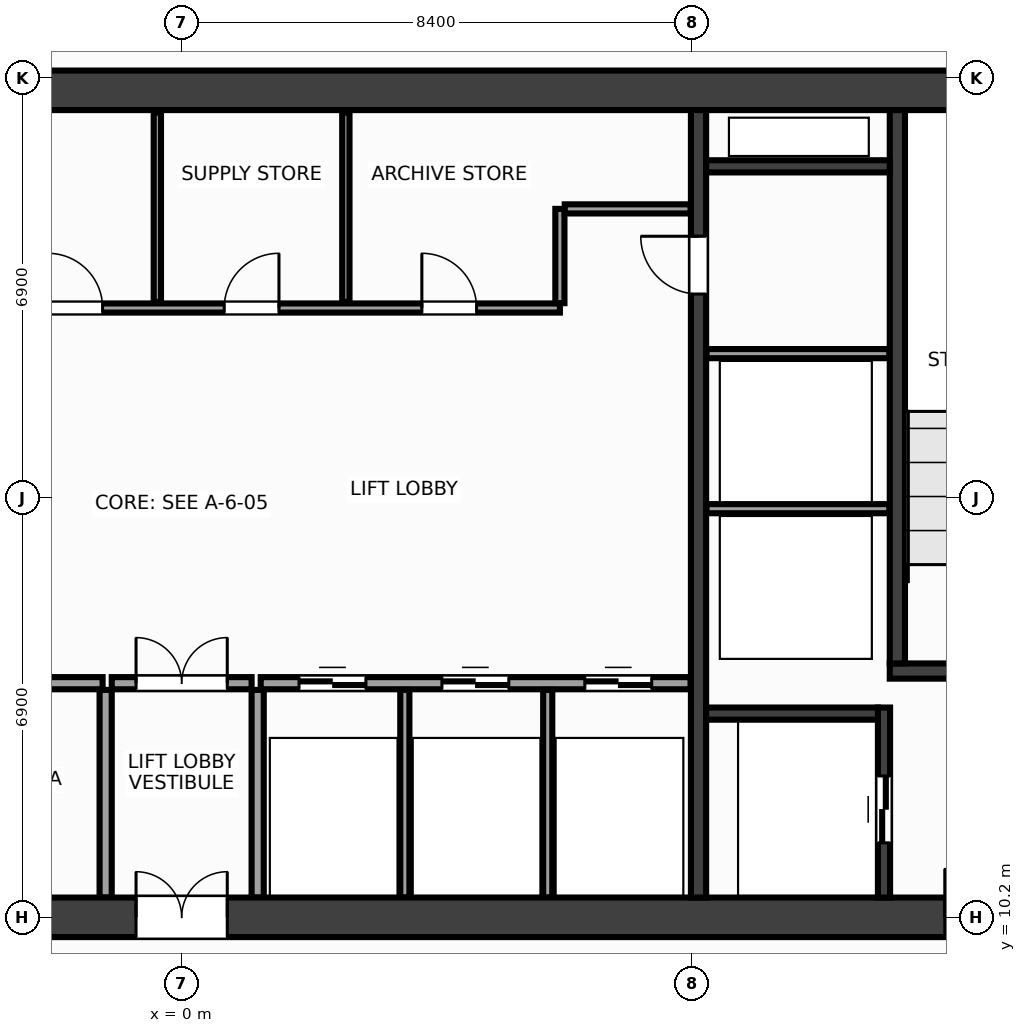
"""IFC4 building model, lengths in metres.
Left out: names, types, materials, properties, quantities, classifications, styles, units other than length and angle.
Written with IfcOpenShell. Run it as: python <this file> out.ifc"""

import sys

from ifc_helpers import new_model, si_unit, direction, frame, frame_2d, origin, place, context, subcontext, project, spatial, rectangle, extrude, source, transform, mapped, element, fill, save


model = new_model("IFC4")
c1 = context("Model", 3, precision=1e-05, world=origin(), true_north=direction((0.0, 1.0)))
c2 = subcontext(c1, "Body", "Model", "MODEL_VIEW")
j1 = project(units=[si_unit("LENGTHUNIT", "METRE"), si_unit("PLANEANGLEUNIT", "RADIAN")], contexts=[c1])
p1 = place(None, origin())
s1 = spatial("IfcSite", under=j1, at=p1, CompositionType="ELEMENT")
p2 = place(p1, origin())
s2 = spatial("IfcBuilding", under=s1, at=p2, CompositionType="ELEMENT")
p3 = place(p2, frame((0.0, 0.0, 182.0)))
s3 = spatial("IfcBuildingStorey", under=s2, at=p3, CompositionType="ELEMENT", Elevation=182.0)
m1 = source(origin(), c2, "Body", "SweptSolid", [
    extrude(rectangle(XDim=31.85, YDim=0.65, at=frame_2d((15.925, 0.0))), origin(), (0.0, 0.0, 1.0), 3.6),
])
p4 = place(p3, frame((-15.925, 23.8, 0.0), z_axis=(0.0, 0.0, 1.0), x_axis=(1.0, 0.0, 0.0)))
e1 = element("IfcWall", 1, at=p4, inside=s3, PredefinedType="SHEAR", context=c2, shape_type="MappedRepresentation", body=[
    mapped(m1, transform((0.0, 0.0, 0.0), x_axis=(1.0, 0.0, 0.0), y_axis=(0.0, 1.0, 0.0), z_axis=(0.0, 0.0, 1.0), scale=1.0)),
])
p5 = place(p3, frame((-15.925, 10.2, 0.0), z_axis=(0.0, 0.0, 1.0), x_axis=(1.0, 0.0, 0.0)))
e2 = element("IfcWall", 2, at=p5, inside=s3, PredefinedType="SHEAR", context=c2, shape_type="MappedRepresentation", body=[
    mapped(m1, transform((0.0, 0.0, 0.0), x_axis=(1.0, 0.0, 0.0), y_axis=(0.0, 1.0, 0.0), z_axis=(0.0, 0.0, 1.0), scale=1.0)),
])
p6 = place(p5, frame((1.775, 0.0, 0.0)))
e3 = element("IfcOpeningElement", 3, at=p6, cuts=e2, PredefinedType="OPENING", context=c2, shape_type="SweptSolid", body=[
    extrude(rectangle(XDim=1.6, YDim=2.15, at=frame_2d((0.8, 1.075))), frame((0.0, 0.337, 0.0), z_axis=(0.0, -1.0, 0.0), x_axis=(1.0, 0.0, 0.0)), (0.0, 0.0, 1.0), 0.674),
])
p7 = place(p5, frame((28.475, 0.0, 0.0)))
e4 = element("IfcOpeningElement", 4, at=p7, cuts=e2, PredefinedType="OPENING", context=c2, shape_type="SweptSolid", body=[
    extrude(rectangle(XDim=1.6, YDim=2.15, at=frame_2d((0.8, 1.075))), frame((0.0, 0.337, 0.0), z_axis=(0.0, -1.0, 0.0), x_axis=(1.0, 0.0, 0.0)), (0.0, 0.0, 1.0), 0.674),
])
p8 = place(p5, frame((15.175, 0.0, 0.0)))
e5 = element("IfcOpeningElement", 5, at=p8, cuts=e2, PredefinedType="OPENING", context=c2, shape_type="SweptSolid", body=[
    extrude(rectangle(XDim=1.5, YDim=2.2, at=frame_2d((0.75, 1.1))), frame((0.0, 0.337, 0.0), z_axis=(0.0, -1.0, 0.0), x_axis=(1.0, 0.0, 0.0)), (0.0, 0.0, 1.0), 0.674),
])
m2 = source(origin(), c2, "Body", "SweptSolid", [
    extrude(rectangle(XDim=12.95, YDim=0.25, at=frame_2d((6.475, 0.0))), origin(), (0.0, 0.0, 1.0), 3.6),
])
p9 = place(p3, frame((8.5, 10.525, 0.0), z_axis=(0.0, 0.0, 1.0), x_axis=(0.0, 1.0, 0.0)))
e6 = element("IfcWall", 6, at=p9, inside=s3, PredefinedType="SHEAR", context=c2, shape_type="MappedRepresentation", body=[
    mapped(m2, transform((0.0, 0.0, 0.0), x_axis=(1.0, 0.0, 0.0), y_axis=(0.0, 1.0, 0.0), z_axis=(0.0, 0.0, 1.0), scale=1.0)),
])
p10 = place(p9, frame((9.925, 0.0, 0.0)))
e7 = element("IfcOpeningElement", 7, at=p10, cuts=e6, PredefinedType="OPENING", context=c2, shape_type="SweptSolid", body=[
    extrude(rectangle(XDim=0.95, YDim=2.15, at=frame_2d((0.475, 1.075))), frame((0.0, 0.137, 0.0), z_axis=(0.0, -1.0, 0.0), x_axis=(1.0, 0.0, 0.0)), (0.0, 0.0, 1.0), 0.274),
])
m3 = source(origin(), c2, "Body", "SweptSolid", [
    extrude(rectangle(XDim=3.63, YDim=0.25, at=frame_2d((1.815, 0.0))), origin(), (0.0, 0.0, 1.0), 3.6),
])
p11 = place(p3, frame((11.645, 14.25, 0.0), z_axis=(0.0, 0.0, 1.0), x_axis=(1.0, 0.0, 0.0)))
e8 = element("IfcWall", 8, at=p11, inside=s3, PredefinedType="SHEAR", context=c2, shape_type="MappedRepresentation", body=[
    mapped(m3, transform((0.0, 0.0, 0.0), x_axis=(1.0, 0.0, 0.0), y_axis=(0.0, 1.0, 0.0), z_axis=(0.0, 0.0, 1.0), scale=1.0)),
])
p12 = place(p11, frame((0.95, 0.0, 0.0)))
e9 = element("IfcOpeningElement", 9, at=p12, cuts=e8, PredefinedType="OPENING", context=c2, shape_type="SweptSolid", body=[
    extrude(rectangle(XDim=1.6, YDim=2.15, at=frame_2d((0.8, 1.075))), frame((0.0, 0.137, 0.0), z_axis=(0.0, -1.0, 0.0), x_axis=(1.0, 0.0, 0.0)), (0.0, 0.0, 1.0), 0.274),
])
m4 = source(origin(), c2, "Body", "SweptSolid", [
    extrude(rectangle(XDim=9.1, YDim=0.25, at=frame_2d((4.55, 0.0))), origin(), (0.0, 0.0, 1.0), 3.6),
])
p13 = place(p3, frame((11.77, 14.375, 0.0), z_axis=(0.0, 0.0, 1.0), x_axis=(0.0, 1.0, 0.0)))
e10 = element("IfcWall", 10, at=p13, inside=s3, PredefinedType="SHEAR", context=c2, shape_type="MappedRepresentation", body=[
    mapped(m4, transform((0.0, 0.0, 0.0), x_axis=(1.0, 0.0, 0.0), y_axis=(0.0, 1.0, 0.0), z_axis=(0.0, 0.0, 1.0), scale=1.0)),
])
m5 = source(origin(), c2, "Body", "SweptSolid", [
    extrude(rectangle(XDim=3.125, YDim=0.2, at=frame_2d((1.562, 0.0))), origin(), (0.0, 0.0, 1.0), 3.6),
])
p14 = place(p3, frame((11.55, 10.525, 0.0), z_axis=(0.0, 0.0, 1.0), x_axis=(0.0, 1.0, 0.0)))
e11 = element("IfcWall", 11, at=p14, inside=s3, PredefinedType="SHEAR", context=c2, shape_type="MappedRepresentation", body=[
    mapped(m5, transform((0.0, 0.0, 0.0), x_axis=(1.0, 0.0, 0.0), y_axis=(0.0, 1.0, 0.0), z_axis=(0.0, 0.0, 1.0), scale=1.0)),
])
p15 = place(p14, frame((0.9, 0.0, 0.0)))
e12 = element("IfcOpeningElement", 12, at=p15, cuts=e11, PredefinedType="OPENING", context=c2, shape_type="SweptSolid", body=[
    extrude(rectangle(XDim=1.1, YDim=2.15, at=frame_2d((0.55, 1.075))), frame((0.0, 0.112, 0.0), z_axis=(0.0, -1.0, 0.0), x_axis=(1.0, 0.0, 0.0)), (0.0, 0.0, 1.0), 0.224),
])
m6 = source(origin(), c2, "Body", "SweptSolid", [
    extrude(rectangle(XDim=2.825, YDim=0.2, at=frame_2d((1.413, 0.0))), origin(), (0.0, 0.0, 1.0), 3.6),
])
p16 = place(p3, frame((8.625, 13.55, 0.0), z_axis=(0.0, 0.0, 1.0), x_axis=(1.0, 0.0, 0.0)))
e13 = element("IfcWall", 13, at=p16, inside=s3, PredefinedType="SHEAR", context=c2, shape_type="MappedRepresentation", body=[
    mapped(m6, transform((0.0, 0.0, 0.0), x_axis=(1.0, 0.0, 0.0), y_axis=(0.0, 1.0, 0.0), z_axis=(0.0, 0.0, 1.0), scale=1.0)),
])
m7 = source(origin(), c2, "Body", "SweptSolid", [
    extrude(rectangle(XDim=3.02, YDim=0.2, at=frame_2d((1.51, 0.0))), origin(), (0.0, 0.0, 1.0), 3.6),
])
p17 = place(p3, frame((8.625, 22.55, 0.0), z_axis=(0.0, 0.0, 1.0), x_axis=(1.0, 0.0, 0.0)))
e14 = element("IfcWall", 14, at=p17, inside=s3, PredefinedType="SHEAR", context=c2, shape_type="MappedRepresentation", body=[
    mapped(m7, transform((0.0, 0.0, 0.0), x_axis=(1.0, 0.0, 0.0), y_axis=(0.0, 1.0, 0.0), z_axis=(0.0, 0.0, 1.0), scale=1.0)),
])
m8 = source(origin(), c2, "Body", "SweptSolid", [
    extrude(rectangle(XDim=3.01, YDim=0.15, at=frame_2d((1.505, 0.0))), origin(), (0.0, 0.0, 1.0), 3.38),
])
for number, where, z_axis, x_axis in (
    (15, (8.63, 16.92, 0.0), (0.0, 0.0, 1.0), (1.0, 0.0, 0.0)),
    (16, (8.63, 19.47, 0.0), (0.0, 0.0, 1.0), (1.0, 0.0, 0.0)),
):
    element("IfcWall", number, at=place(p3, frame(where, z_axis=z_axis, x_axis=x_axis)), inside=s3, PredefinedType="PARTITIONING", context=c2, shape_type="MappedRepresentation", body=[
        mapped(m8, transform((0.0, 0.0, 0.0), x_axis=(1.0, 0.0, 0.0), y_axis=(0.0, 1.0, 0.0), z_axis=(0.0, 0.0, 1.0), scale=1.0)),
    ])
m9 = source(origin(), c2, "Body", "SweptSolid", [
    extrude(rectangle(XDim=7.07, YDim=0.2, at=frame_2d((3.535, 0.0))), origin(), (0.0, 0.0, 1.0), 3.38),
])
p18 = place(p3, frame((-8.37, 14.05, 0.0), z_axis=(0.0, 0.0, 1.0), x_axis=(1.0, 0.0, 0.0)))
e17 = element("IfcWall", 17, at=p18, inside=s3, PredefinedType="PARTITIONING", context=c2, shape_type="MappedRepresentation", body=[
    mapped(m9, transform((0.0, 0.0, 0.0), x_axis=(1.0, 0.0, 0.0), y_axis=(0.0, 1.0, 0.0), z_axis=(0.0, 0.0, 1.0), scale=1.0)),
])
p19 = place(p18, frame((1.06, 0.0, 0.0)))
e18 = element("IfcOpeningElement", 18, at=p19, cuts=e17, PredefinedType="OPENING", context=c2, shape_type="SweptSolid", body=[
    extrude(rectangle(XDim=0.9, YDim=2.15, at=frame_2d((0.45, 1.075))), frame((0.0, 0.112, 0.0), z_axis=(0.0, -1.0, 0.0), x_axis=(1.0, 0.0, 0.0)), (0.0, 0.0, 1.0), 0.224),
])
p20 = place(p18, frame((4.51, 0.0, 0.0)))
e19 = element("IfcOpeningElement", 19, at=p20, cuts=e17, PredefinedType="OPENING", context=c2, shape_type="SweptSolid", body=[
    extrude(rectangle(XDim=0.9, YDim=2.15, at=frame_2d((0.45, 1.075))), frame((0.0, 0.112, 0.0), z_axis=(0.0, -1.0, 0.0), x_axis=(1.0, 0.0, 0.0)), (0.0, 0.0, 1.0), 0.224),
])
p21 = place(p3, frame((1.3, 14.05, 0.0), z_axis=(0.0, 0.0, 1.0), x_axis=(1.0, 0.0, 0.0)))
e20 = element("IfcWall", 20, at=p21, inside=s3, PredefinedType="PARTITIONING", context=c2, shape_type="MappedRepresentation", body=[
    mapped(m9, transform((0.0, 0.0, 0.0), x_axis=(1.0, 0.0, 0.0), y_axis=(0.0, 1.0, 0.0), z_axis=(0.0, 0.0, 1.0), scale=1.0)),
])
p22 = place(p21, frame((0.63, 0.0, 0.0)))
e21 = element("IfcOpeningElement", 21, at=p22, cuts=e20, PredefinedType="OPENING", context=c2, shape_type="SweptSolid", body=[
    extrude(rectangle(XDim=1.1, YDim=2.15, at=frame_2d((0.55, 1.075))), frame((0.0, 0.112, 0.0), z_axis=(0.0, -1.0, 0.0), x_axis=(1.0, 0.0, 0.0)), (0.0, 0.0, 1.0), 0.224),
])
p23 = place(p21, frame((2.98, 0.0, 0.0)))
e22 = element("IfcOpeningElement", 22, at=p23, cuts=e20, PredefinedType="OPENING", context=c2, shape_type="SweptSolid", body=[
    extrude(rectangle(XDim=1.1, YDim=2.15, at=frame_2d((0.55, 1.075))), frame((0.0, 0.112, 0.0), z_axis=(0.0, -1.0, 0.0), x_axis=(1.0, 0.0, 0.0)), (0.0, 0.0, 1.0), 0.224),
])
p24 = place(p21, frame((5.33, 0.0, 0.0)))
e23 = element("IfcOpeningElement", 23, at=p24, cuts=e20, PredefinedType="OPENING", context=c2, shape_type="SweptSolid", body=[
    extrude(rectangle(XDim=1.1, YDim=2.15, at=frame_2d((0.55, 1.075))), frame((0.0, 0.112, 0.0), z_axis=(0.0, -1.0, 0.0), x_axis=(1.0, 0.0, 0.0)), (0.0, 0.0, 1.0), 0.224),
])
m10 = source(origin(), c2, "Body", "SweptSolid", [
    extrude(rectangle(XDim=3.415, YDim=0.2, at=frame_2d((1.708, 0.0))), origin(), (0.0, 0.0, 1.0), 3.38),
])
for number, where, z_axis, x_axis in (
    (24, (-1.25, 10.525, 0.0), (0.0, 0.0, 1.0), (0.0, 1.0, 0.0)),
    (25, (1.25, 10.525, 0.0), (0.0, 0.0, 1.0), (0.0, 1.0, 0.0)),
):
    element("IfcWall", number, at=place(p3, frame(where, z_axis=z_axis, x_axis=x_axis)), inside=s3, PredefinedType="PARTITIONING", context=c2, shape_type="MappedRepresentation", body=[
        mapped(m10, transform((0.0, 0.0, 0.0), x_axis=(1.0, 0.0, 0.0), y_axis=(0.0, 1.0, 0.0), z_axis=(0.0, 0.0, 1.0), scale=1.0)),
    ])
m11 = source(origin(), c2, "Body", "SweptSolid", [
    extrude(rectangle(XDim=2.3, YDim=0.2, at=frame_2d((1.15, 0.0))), origin(), (0.0, 0.0, 1.0), 3.38),
])
p25 = place(p3, frame((-1.15, 14.05, 0.0), z_axis=(0.0, 0.0, 1.0), x_axis=(1.0, 0.0, 0.0)))
e26 = element("IfcWall", 26, at=p25, inside=s3, PredefinedType="PARTITIONING", context=c2, shape_type="MappedRepresentation", body=[
    mapped(m11, transform((0.0, 0.0, 0.0), x_axis=(1.0, 0.0, 0.0), y_axis=(0.0, 1.0, 0.0), z_axis=(0.0, 0.0, 1.0), scale=1.0)),
])
p26 = place(p25, frame((0.4, 0.0, 0.0)))
e27 = element("IfcOpeningElement", 27, at=p26, cuts=e26, PredefinedType="OPENING", context=c2, shape_type="SweptSolid", body=[
    extrude(rectangle(XDim=1.5, YDim=2.2, at=frame_2d((0.75, 1.1))), frame((0.0, 0.112, 0.0), z_axis=(0.0, -1.0, 0.0), x_axis=(1.0, 0.0, 0.0)), (0.0, 0.0, 1.0), 0.224),
])
m12 = source(origin(), c2, "Body", "SweptSolid", [
    extrude(rectangle(XDim=14.59, YDim=0.15, at=frame_2d((7.295, 0.0))), origin(), (0.0, 0.0, 1.0), 3.38),
])
p27 = place(p3, frame((-8.37, 20.22, 0.0), z_axis=(0.0, 0.0, 1.0), x_axis=(1.0, 0.0, 0.0)))
e28 = element("IfcWall", 28, at=p27, inside=s3, PredefinedType="PARTITIONING", context=c2, shape_type="MappedRepresentation", body=[
    mapped(m12, transform((0.0, 0.0, 0.0), x_axis=(1.0, 0.0, 0.0), y_axis=(0.0, 1.0, 0.0), z_axis=(0.0, 0.0, 1.0), scale=1.0)),
])
p28 = place(p27, frame((0.86, 0.0, 0.0)))
e29 = element("IfcOpeningElement", 29, at=p28, cuts=e28, PredefinedType="OPENING", context=c2, shape_type="SweptSolid", body=[
    extrude(rectangle(XDim=0.9, YDim=2.15, at=frame_2d((0.45, 1.075))), frame((0.0, 0.087, 0.0), z_axis=(0.0, -1.0, 0.0), x_axis=(1.0, 0.0, 0.0)), (0.0, 0.0, 1.0), 0.174),
])
p29 = place(p27, frame((3.47, 0.0, 0.0)))
e30 = element("IfcOpeningElement", 30, at=p29, cuts=e28, PredefinedType="OPENING", context=c2, shape_type="SweptSolid", body=[
    extrude(rectangle(XDim=0.9, YDim=2.15, at=frame_2d((0.45, 1.075))), frame((0.0, 0.087, 0.0), z_axis=(0.0, -1.0, 0.0), x_axis=(1.0, 0.0, 0.0)), (0.0, 0.0, 1.0), 0.174),
])
p30 = place(p27, frame((6.17, 0.0, 0.0)))
e31 = element("IfcOpeningElement", 31, at=p30, cuts=e28, PredefinedType="OPENING", context=c2, shape_type="SweptSolid", body=[
    extrude(rectangle(XDim=0.9, YDim=2.15, at=frame_2d((0.45, 1.075))), frame((0.0, 0.087, 0.0), z_axis=(0.0, -1.0, 0.0), x_axis=(1.0, 0.0, 0.0)), (0.0, 0.0, 1.0), 0.174),
])
p31 = place(p27, frame((9.07, 0.0, 0.0)))
e32 = element("IfcOpeningElement", 32, at=p31, cuts=e28, PredefinedType="OPENING", context=c2, shape_type="SweptSolid", body=[
    extrude(rectangle(XDim=0.9, YDim=2.15, at=frame_2d((0.45, 1.075))), frame((0.0, 0.087, 0.0), z_axis=(0.0, -1.0, 0.0), x_axis=(1.0, 0.0, 0.0)), (0.0, 0.0, 1.0), 0.174),
])
p32 = place(p27, frame((12.32, 0.0, 0.0)))
e33 = element("IfcOpeningElement", 33, at=p32, cuts=e28, PredefinedType="OPENING", context=c2, shape_type="SweptSolid", body=[
    extrude(rectangle(XDim=0.9, YDim=2.15, at=frame_2d((0.45, 1.075))), frame((0.0, 0.087, 0.0), z_axis=(0.0, -1.0, 0.0), x_axis=(1.0, 0.0, 0.0)), (0.0, 0.0, 1.0), 0.174),
])
m13 = source(origin(), c2, "Body", "SweptSolid", [
    extrude(rectangle(XDim=1.55, YDim=0.15, at=frame_2d((0.775, 0.0))), origin(), (0.0, 0.0, 1.0), 3.38),
])
p33 = place(p3, frame((6.22, 20.3, 0.0), z_axis=(0.0, 0.0, 1.0), x_axis=(0.0, 1.0, 0.0)))
e34 = element("IfcWall", 34, at=p33, inside=s3, PredefinedType="PARTITIONING", context=c2, shape_type="MappedRepresentation", body=[
    mapped(m13, transform((0.0, 0.0, 0.0), x_axis=(1.0, 0.0, 0.0), y_axis=(0.0, 1.0, 0.0), z_axis=(0.0, 0.0, 1.0), scale=1.0)),
])
m14 = source(origin(), c2, "Body", "SweptSolid", [
    extrude(rectangle(XDim=2.07, YDim=0.15, at=frame_2d((1.035, 0.0))), origin(), (0.0, 0.0, 1.0), 3.38),
])
p34 = place(p3, frame((6.3, 21.85, 0.0), z_axis=(0.0, 0.0, 1.0), x_axis=(1.0, 0.0, 0.0)))
e35 = element("IfcWall", 35, at=p34, inside=s3, PredefinedType="PARTITIONING", context=c2, shape_type="MappedRepresentation", body=[
    mapped(m14, transform((0.0, 0.0, 0.0), x_axis=(1.0, 0.0, 0.0), y_axis=(0.0, 1.0, 0.0), z_axis=(0.0, 0.0, 1.0), scale=1.0)),
])
m15 = source(origin(), c2, "Body", "SweptSolid", [
    extrude(rectangle(XDim=3.415, YDim=0.15, at=frame_2d((1.708, 0.0))), origin(), (0.0, 0.0, 1.0), 3.38),
])
for number, where, z_axis, x_axis in (
    (36, (3.67, 10.525, 0.0), (0.0, 0.0, 1.0), (0.0, 1.0, 0.0)),
    (37, (6.02, 10.525, 0.0), (0.0, 0.0, 1.0), (0.0, 1.0, 0.0)),
):
    element("IfcWall", number, at=place(p3, frame(where, z_axis=z_axis, x_axis=x_axis)), inside=s3, PredefinedType="PARTITIONING", context=c2, shape_type="MappedRepresentation", body=[
        mapped(m15, transform((0.0, 0.0, 0.0), x_axis=(1.0, 0.0, 0.0), y_axis=(0.0, 1.0, 0.0), z_axis=(0.0, 0.0, 1.0), scale=1.0)),
    ])
m16 = source(origin(), c2, "Body", "SweptSolid", [
    extrude(rectangle(XDim=3.115, YDim=0.12, at=frame_2d((1.558, 0.0))), origin(), (0.0, 0.0, 1.0), 3.38),
])
for number, where, z_axis, x_axis in (
    (38, (-0.4, 20.32, 0.0), (0.0, 0.0, 1.0), (0.0, 1.0, 0.0)),
    (39, (2.7, 20.32, 0.0), (0.0, 0.0, 1.0), (0.0, 1.0, 0.0)),
):
    element("IfcWall", number, at=place(p3, frame(where, z_axis=z_axis, x_axis=x_axis)), inside=s3, PredefinedType="PARTITIONING", context=c2, shape_type="MappedRepresentation", body=[
        mapped(m16, transform((0.0, 0.0, 0.0), x_axis=(1.0, 0.0, 0.0), y_axis=(0.0, 1.0, 0.0), z_axis=(0.0, 0.0, 1.0), scale=1.0)),
    ])
m17 = source(origin(), c2, "Body", "SweptSolid", [
    extrude(rectangle(XDim=1.6, YDim=2.15, at=frame_2d((0.8, 1.075))), frame((0.0, 0.025, 0.0), z_axis=(0.0, -1.0, 0.0), x_axis=(1.0, 0.0, 0.0)), (0.0, 0.0, 1.0), 0.05),
])
p35 = place(p7, origin())
e40 = element("IfcDoor", 40, at=p35, inside=s3, OperationType="DOUBLE_DOOR_SINGLE_SWING", PredefinedType="DOOR", context=c2, shape_type="MappedRepresentation", body=[
    mapped(m17, transform((0.0, 0.0, 0.0), x_axis=(1.0, 0.0, 0.0), y_axis=(0.0, 1.0, 0.0), z_axis=(0.0, 0.0, 1.0), scale=1.0)),
])
fill(e4, e40)
m18 = source(origin(), c2, "Body", "SweptSolid", [
    extrude(rectangle(XDim=1.1, YDim=2.15, at=frame_2d((0.55, 1.075))), frame((0.0, 0.025, 0.0), z_axis=(0.0, -1.0, 0.0), x_axis=(1.0, 0.0, 0.0)), (0.0, 0.0, 1.0), 0.05),
])
p36 = place(p15, origin())
e41 = element("IfcDoor", 41, at=p36, inside=s3, OperationType="DOUBLE_DOOR_SLIDING", PredefinedType="DOOR", context=c2, shape_type="MappedRepresentation", body=[
    mapped(m18, transform((0.0, 0.0, 0.0), x_axis=(1.0, 0.0, 0.0), y_axis=(0.0, 1.0, 0.0), z_axis=(0.0, 0.0, 1.0), scale=1.0)),
])
fill(e12, e41)
m19 = source(origin(), c2, "Body", "SweptSolid", [
    extrude(rectangle(XDim=0.95, YDim=2.15, at=frame_2d((0.475, 1.075))), frame((0.0, 0.025, 0.0), z_axis=(0.0, -1.0, 0.0), x_axis=(1.0, 0.0, 0.0)), (0.0, 0.0, 1.0), 0.05),
])
p37 = place(p10, origin())
e42 = element("IfcDoor", 42, at=p37, inside=s3, OperationType="SINGLE_SWING_RIGHT", PredefinedType="DOOR", context=c2, shape_type="MappedRepresentation", body=[
    mapped(m19, transform((0.0, 0.0, 0.0), x_axis=(1.0, 0.0, 0.0), y_axis=(0.0, 1.0, 0.0), z_axis=(0.0, 0.0, 1.0), scale=1.0)),
])
fill(e7, e42)
p38 = place(p22, origin())
e43 = element("IfcDoor", 43, at=p38, inside=s3, OperationType="DOUBLE_DOOR_SLIDING", PredefinedType="DOOR", context=c2, shape_type="MappedRepresentation", body=[
    mapped(m18, transform((0.0, 0.0, 0.0), x_axis=(1.0, 0.0, 0.0), y_axis=(0.0, 1.0, 0.0), z_axis=(0.0, 0.0, 1.0), scale=1.0)),
])
fill(e21, e43)
p39 = place(p23, origin())
e44 = element("IfcDoor", 44, at=p39, inside=s3, OperationType="DOUBLE_DOOR_SLIDING", PredefinedType="DOOR", context=c2, shape_type="MappedRepresentation", body=[
    mapped(m18, transform((0.0, 0.0, 0.0), x_axis=(1.0, 0.0, 0.0), y_axis=(0.0, 1.0, 0.0), z_axis=(0.0, 0.0, 1.0), scale=1.0)),
])
fill(e22, e44)
p40 = place(p24, origin())
e45 = element("IfcDoor", 45, at=p40, inside=s3, OperationType="DOUBLE_DOOR_SLIDING", PredefinedType="DOOR", context=c2, shape_type="MappedRepresentation", body=[
    mapped(m18, transform((0.0, 0.0, 0.0), x_axis=(1.0, 0.0, 0.0), y_axis=(0.0, 1.0, 0.0), z_axis=(0.0, 0.0, 1.0), scale=1.0)),
])
fill(e23, e45)
m20 = source(origin(), c2, "Body", "SweptSolid", [
    extrude(rectangle(XDim=1.5, YDim=2.2, at=frame_2d((0.75, 1.1))), frame((0.0, 0.025, 0.0), z_axis=(0.0, -1.0, 0.0), x_axis=(1.0, 0.0, 0.0)), (0.0, 0.0, 1.0), 0.05),
])
p41 = place(p26, origin())
e46 = element("IfcDoor", 46, at=p41, inside=s3, OperationType="DOUBLE_DOOR_SINGLE_SWING", PredefinedType="DOOR", context=c2, shape_type="MappedRepresentation", body=[
    mapped(m20, transform((0.0, 0.0, 0.0), x_axis=(1.0, 0.0, 0.0), y_axis=(0.0, 1.0, 0.0), z_axis=(0.0, 0.0, 1.0), scale=1.0)),
])
fill(e27, e46)
p42 = place(p8, origin())
e47 = element("IfcDoor", 47, at=p42, inside=s3, OperationType="DOUBLE_DOOR_SINGLE_SWING", PredefinedType="DOOR", context=c2, shape_type="MappedRepresentation", body=[
    mapped(m20, transform((0.0, 0.0, 0.0), x_axis=(1.0, 0.0, 0.0), y_axis=(0.0, 1.0, 0.0), z_axis=(0.0, 0.0, 1.0), scale=1.0)),
])
fill(e5, e47)
m21 = source(origin(), c2, "Body", "SweptSolid", [
    extrude(rectangle(XDim=0.9, YDim=2.15, at=frame_2d((0.45, 1.075))), frame((0.0, 0.025, 0.0), z_axis=(0.0, -1.0, 0.0), x_axis=(1.0, 0.0, 0.0)), (0.0, 0.0, 1.0), 0.05),
])
p43 = place(p30, origin())
e48 = element("IfcDoor", 48, at=p43, inside=s3, OperationType="SINGLE_SWING_LEFT", PredefinedType="DOOR", context=c2, shape_type="MappedRepresentation", body=[
    mapped(m21, transform((0.0, 0.0, 0.0), x_axis=(1.0, 0.0, 0.0), y_axis=(0.0, 1.0, 0.0), z_axis=(0.0, 0.0, 1.0), scale=1.0)),
])
fill(e31, e48)
p44 = place(p31, origin())
e49 = element("IfcDoor", 49, at=p44, inside=s3, OperationType="SINGLE_SWING_RIGHT", PredefinedType="DOOR", context=c2, shape_type="MappedRepresentation", body=[
    mapped(m21, transform((0.0, 0.0, 0.0), x_axis=(1.0, 0.0, 0.0), y_axis=(0.0, 1.0, 0.0), z_axis=(0.0, 0.0, 1.0), scale=1.0)),
])
fill(e32, e49)
p45 = place(p32, origin())
e50 = element("IfcDoor", 50, at=p45, inside=s3, OperationType="SINGLE_SWING_LEFT", PredefinedType="DOOR", context=c2, shape_type="MappedRepresentation", body=[
    mapped(m21, transform((0.0, 0.0, 0.0), x_axis=(1.0, 0.0, 0.0), y_axis=(0.0, 1.0, 0.0), z_axis=(0.0, 0.0, 1.0), scale=1.0)),
])
fill(e33, e50)
save(model, sys.argv[1])
